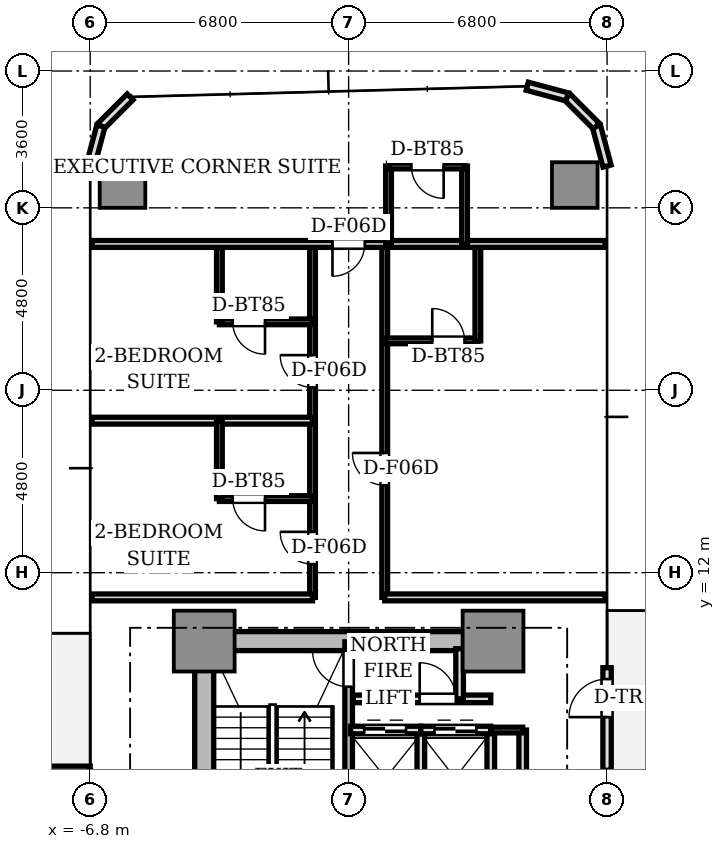
"""IFC4 building model, lengths in metres.
Left out: names, types, materials, properties, quantities, classifications, styles, units other than length and angle.
Written with IfcOpenShell. Run it as: python <this file> out.ifc"""

import sys

from ifc_helpers import new_model, si_unit, direction, frame, frame_2d, origin, origin_2d, place, context, subcontext, project, spatial, rectangle, extrude, source, transform, mapped, element, fill, save


model = new_model("IFC4")
c1 = context("Model", 3, precision=1e-05, world=origin(), true_north=direction((0.0, 1.0)))
c2 = subcontext(c1, "Body", "Model", "MODEL_VIEW")
j1 = project(units=[si_unit("LENGTHUNIT", "METRE"), si_unit("PLANEANGLEUNIT", "RADIAN")], contexts=[c1])
p1 = place(None, origin())
s1 = spatial("IfcSite", under=j1, at=p1, CompositionType="ELEMENT")
p2 = place(p1, origin())
s2 = spatial("IfcBuilding", under=s1, at=p2, CompositionType="ELEMENT")
p3 = place(p2, frame((0.0, 0.0, 54.4)))
s3 = spatial("IfcBuildingStorey", under=s2, at=p3, CompositionType="ELEMENT", Elevation=54.4)
p4 = place(p3, frame((-3.55, 10.2, 0.0), z_axis=(0.0, 0.0, 1.0), x_axis=(1.0, 0.0, 0.0)))
e1 = element("IfcWall", 1, at=p4, inside=s3, PredefinedType="SHEAR", context=c2, shape_type="SweptSolid", body=[
    extrude(rectangle(XDim=7.1, YDim=0.5, at=frame_2d((3.55, 0.0))), origin(), (0.0, 0.0, 1.0), 3.11),
])
p5 = place(p3, frame((-3.8, 2.85, 0.0), z_axis=(0.0, 0.0, 1.0), x_axis=(0.0, 1.0, 0.0)))
e2 = element("IfcWall", 2, at=p5, inside=s3, PredefinedType="SHEAR", context=c2, shape_type="SweptSolid", body=[
    extrude(rectangle(XDim=6.9, YDim=0.5, at=frame_2d((3.45, 0.0))), origin(), (0.0, 0.0, 1.0), 3.11),
])
m1 = source(origin(), c2, "Body", "SweptSolid", [
    extrude(rectangle(XDim=1.6, YDim=1.6, at=origin_2d()), origin(), (0.0, 0.0, 1.0), 3.11),
])
for number, where, z_axis, x_axis in (
    (3, (-3.8, 10.2, 0.0), (0.0, 0.0, 1.0), (1.0, 0.0, 0.0)),
    (4, (3.8, 10.2, 0.0), (0.0, 0.0, 1.0), (1.0, 0.0, 0.0)),
):
    element("IfcColumn", number, at=place(p3, frame(where, z_axis=z_axis, x_axis=x_axis)), inside=s3, PredefinedType="COLUMN", context=c2, shape_type="MappedRepresentation", body=[
        mapped(m1, transform((0.0, 0.0, 0.0), scale=1.0)),
    ])
m2 = source(origin(), c2, "Body", "SweptSolid", [
    extrude(rectangle(XDim=1.2, YDim=1.2, at=origin_2d()), origin(), (0.0, 0.0, 1.0), 3.11),
])
for number, where, z_axis, x_axis in (
    (5, (5.95, 22.2, 0.0), (0.0, 0.0, 1.0), (1.0, 0.0, 0.0)),
    (6, (-5.95, 22.2, 0.0), (0.0, 0.0, 1.0), (1.0, 0.0, 0.0)),
):
    element("IfcColumn", number, at=place(p3, frame(where, z_axis=z_axis, x_axis=x_axis)), inside=s3, PredefinedType="COLUMN", context=c2, shape_type="MappedRepresentation", body=[
        mapped(m2, transform((0.0, 0.0, 0.0), scale=1.0)),
    ])
p6 = place(p3, frame((6.8, 6.8, 0.0), z_axis=(0.0, 0.0, 1.0), x_axis=(0.0, 1.0, 0.0)))
e7 = element("IfcWall", 7, at=p6, inside=s3, PredefinedType="STANDARD", context=c2, shape_type="SweptSolid", body=[
    extrude(rectangle(XDim=2.7, YDim=0.22, at=frame_2d((1.35, 0.0))), origin(), (0.0, 0.0, 1.0), 3.11),
])
p7 = place(p6, frame((1.4, 0.0, 0.0)))
e8 = element("IfcOpeningElement", 8, at=p7, cuts=e7, PredefinedType="OPENING", context=c2, shape_type="SweptSolid", body=[
    extrude(rectangle(XDim=1.0, YDim=2.2, at=frame_2d((0.5, 1.1))), frame((0.0, 0.12, 0.0), z_axis=(0.0, -1.0, 0.0), x_axis=(1.0, 0.0, 0.0)), (0.0, 0.0, 1.0), 0.24),
])
for number, where, z_axis, x_axis in (
    (9, (6.8, 22.7, 0.0), (0.0, 0.0, 1.0), (-0.259, 0.966, 0.0)),
    (10, (6.519, 23.75, 0.0), (0.0, 0.0, 1.0), (-0.707, 0.707, 0.0)),
    (11, (5.75, 24.519, 0.0), (0.0, 0.0, 1.0), (-0.966, 0.259, 0.0)),
    (12, (-5.75, 24.519, 0.0), (0.0, 0.0, 1.0), (-0.707, -0.707, 0.0)),
    (13, (-6.519, 23.75, 0.0), (0.0, 0.0, 1.0), (-0.259, -0.966, 0.0)),
):
    element("IfcWall", number, at=place(p3, frame(where, z_axis=z_axis, x_axis=x_axis)), inside=s3, PredefinedType="STANDARD", context=c2, shape_type="SweptSolid", body=[
        extrude(rectangle(XDim=1.087, YDim=0.22, at=frame_2d((0.543, 0.0))), origin(), (0.0, 0.0, 1.0), 3.11),
    ])
p8 = place(p3, frame((-6.8, 6.8, 0.0), z_axis=(0.0, 0.0, 1.0), x_axis=(-1.0, 0.0, 0.0)))
e14 = element("IfcWall", 14, at=p8, inside=s3, PredefinedType="STANDARD", context=c2, shape_type="SweptSolid", body=[
    extrude(rectangle(XDim=2.7, YDim=0.22, at=frame_2d((1.35, 0.0))), origin(), (0.0, 0.0, 1.0), 3.11),
])
p9 = place(p8, frame((1.4, 0.0, 0.0)))
e15 = element("IfcOpeningElement", 15, at=p9, cuts=e14, PredefinedType="OPENING", context=c2, shape_type="SweptSolid", body=[
    extrude(rectangle(XDim=1.0, YDim=2.2, at=frame_2d((0.5, 1.1))), frame((0.0, 0.12, 0.0), z_axis=(0.0, -1.0, 0.0), x_axis=(1.0, 0.0, 0.0)), (0.0, 0.0, 1.0), 0.24),
])
p10 = place(p3, frame((0.0, 2.5, 0.0), z_axis=(0.0, 0.0, 1.0), x_axis=(0.0, 1.0, 0.0)))
e16 = element("IfcWall", 16, at=p10, inside=s3, PredefinedType="SOLIDWALL", context=c2, shape_type="SweptSolid", body=[
    extrude(rectangle(XDim=7.68, YDim=0.2, at=frame_2d((3.84, 0.0))), origin(), (0.0, 0.0, 1.0), 3.11),
])
p11 = place(p10, frame((6.5, 0.0, 0.0)))
e17 = element("IfcOpeningElement", 17, at=p11, cuts=e16, PredefinedType="OPENING", context=c2, shape_type="SweptSolid", body=[
    extrude(rectangle(XDim=0.95, YDim=2.15, at=frame_2d((0.475, 1.075))), frame((0.0, 0.11, 0.0), z_axis=(0.0, -1.0, 0.0), x_axis=(1.0, 0.0, 0.0)), (0.0, 0.0, 1.0), 0.22),
])
p12 = place(p3, frame((1.9, 5.38, 0.0), z_axis=(0.0, 0.0, 1.0), x_axis=(0.0, 1.0, 0.0)))
e18 = element("IfcWall", 18, at=p12, inside=s3, PredefinedType="SOLIDWALL", context=c2, shape_type="SweptSolid", body=[
    extrude(rectangle(XDim=2.48, YDim=0.2, at=frame_2d((1.24, 0.0))), origin(), (0.0, 0.0, 1.0), 2.66),
])
p13 = place(p3, frame((0.05, 7.86, 0.0), z_axis=(0.0, 0.0, 1.0), x_axis=(1.0, 0.0, 0.0)))
e19 = element("IfcWall", 19, at=p13, inside=s3, PredefinedType="SOLIDWALL", context=c2, shape_type="SweptSolid", body=[
    extrude(rectangle(XDim=1.85, YDim=0.2, at=frame_2d((0.925, 0.0))), origin(), (0.0, 0.0, 1.0), 2.66),
])
p14 = place(p13, frame((0.36, 0.0, 0.0)))
e20 = element("IfcOpeningElement", 20, at=p14, cuts=e19, PredefinedType="OPENING", context=c2, shape_type="SweptSolid", body=[
    extrude(rectangle(XDim=1.1, YDim=2.2, at=frame_2d((0.55, 1.1))), frame((0.0, 0.11, 0.0), z_axis=(0.0, -1.0, 0.0), x_axis=(1.0, 0.0, 0.0)), (0.0, 0.0, 1.0), 0.22),
])
p15 = place(p3, frame((3.74, 5.38, 0.0), z_axis=(0.0, 0.0, 1.0), x_axis=(0.0, 1.0, 0.0)))
e21 = element("IfcWall", 21, at=p15, inside=s3, PredefinedType="SOLIDWALL", context=c2, shape_type="SweptSolid", body=[
    extrude(rectangle(XDim=2.48, YDim=0.2, at=frame_2d((1.24, 0.0))), origin(), (0.0, 0.0, 1.0), 2.66),
])
p16 = place(p3, frame((1.9, 7.86, 0.0), z_axis=(0.0, 0.0, 1.0), x_axis=(1.0, 0.0, 0.0)))
e22 = element("IfcWall", 22, at=p16, inside=s3, PredefinedType="SOLIDWALL", context=c2, shape_type="SweptSolid", body=[
    extrude(rectangle(XDim=1.84, YDim=0.2, at=frame_2d((0.92, 0.0))), origin(), (0.0, 0.0, 1.0), 2.66),
])
p17 = place(p16, frame((0.36, 0.0, 0.0)))
e23 = element("IfcOpeningElement", 23, at=p17, cuts=e22, PredefinedType="OPENING", context=c2, shape_type="SweptSolid", body=[
    extrude(rectangle(XDim=1.1, YDim=2.2, at=frame_2d((0.55, 1.1))), frame((0.0, 0.11, 0.0), z_axis=(0.0, -1.0, 0.0), x_axis=(1.0, 0.0, 0.0)), (0.0, 0.0, 1.0), 0.22),
])
p18 = place(p3, frame((0.12, 8.68, 0.0), z_axis=(0.0, 0.0, 1.0), x_axis=(1.0, 0.0, 0.0)))
e24 = element("IfcWall", 24, at=p18, inside=s3, PredefinedType="SOLIDWALL", context=c2, shape_type="SweptSolid", body=[
    extrude(rectangle(XDim=3.62, YDim=0.2, at=frame_2d((1.81, 0.0))), origin(), (0.0, 0.0, 1.0), 2.66),
])
p19 = place(p18, frame((1.75, 0.0, 0.0)))
e25 = element("IfcOpeningElement", 25, at=p19, cuts=e24, PredefinedType="OPENING", context=c2, shape_type="SweptSolid", body=[
    extrude(rectangle(XDim=0.95, YDim=2.15, at=frame_2d((0.475, 1.075))), frame((0.0, 0.11, 0.0), z_axis=(0.0, -1.0, 0.0), x_axis=(1.0, 0.0, 0.0)), (0.0, 0.0, 1.0), 0.22),
])
p20 = place(p3, frame((2.92, 8.68, 0.0), z_axis=(0.0, 0.0, 1.0), x_axis=(0.0, 1.0, 0.0)))
e26 = element("IfcWall", 26, at=p20, inside=s3, PredefinedType="SOLIDWALL", context=c2, shape_type="SweptSolid", body=[
    extrude(rectangle(XDim=1.32, YDim=0.2, at=frame_2d((0.66, 0.0))), origin(), (0.0, 0.0, 1.0), 2.66),
])
p21 = place(p3, frame((4.58, 5.4, 0.0), z_axis=(0.0, 0.0, 1.0), x_axis=(0.0, 1.0, 0.0)))
e27 = element("IfcWall", 27, at=p21, inside=s3, PredefinedType="SOLIDWALL", context=c2, shape_type="SweptSolid", body=[
    extrude(rectangle(XDim=2.46, YDim=0.2, at=frame_2d((1.23, 0.0))), origin(), (0.0, 0.0, 1.0), 2.66),
])
p22 = place(p21, frame((0.55, 0.0, 0.0)))
e28 = element("IfcOpeningElement", 28, at=p22, cuts=e27, PredefinedType="OPENING", context=c2, shape_type="SweptSolid", body=[
    extrude(rectangle(XDim=0.85, YDim=2.1, at=frame_2d((0.425, 1.05))), frame((0.0, 0.11, 0.0), z_axis=(0.0, -1.0, 0.0), x_axis=(1.0, 0.0, 0.0)), (0.0, 0.0, 1.0), 0.22),
])
p23 = place(p3, frame((3.74, 7.86, 0.0), z_axis=(0.0, 0.0, 1.0), x_axis=(1.0, 0.0, 0.0)))
e29 = element("IfcWall", 29, at=p23, inside=s3, PredefinedType="PARTITIONING", context=c2, shape_type="SweptSolid", body=[
    extrude(rectangle(XDim=0.84, YDim=0.15, at=frame_2d((0.42, 0.0))), origin(), (0.0, 0.0, 1.0), 2.66),
])
p24 = place(p3, frame((-0.95, 11.35, 0.0), z_axis=(0.0, 0.0, 1.0), x_axis=(0.0, 1.0, 0.0)))
e30 = element("IfcWall", 30, at=p24, inside=s3, PredefinedType="PARTITIONING", context=c2, shape_type="SweptSolid", body=[
    extrude(rectangle(XDim=9.3, YDim=0.15, at=frame_2d((4.65, 0.0))), origin(), (0.0, 0.0, 1.0), 2.66),
])
p25 = place(p24, frame((0.875, 0.0, 0.0)))
e31 = element("IfcOpeningElement", 31, at=p25, cuts=e30, PredefinedType="OPENING", context=c2, shape_type="SweptSolid", body=[
    extrude(rectangle(XDim=0.85, YDim=2.1, at=frame_2d((0.425, 1.05))), frame((0.0, 0.085, 0.0), z_axis=(0.0, -1.0, 0.0), x_axis=(1.0, 0.0, 0.0)), (0.0, 0.0, 1.0), 0.17),
])
p26 = place(p24, frame((5.525, 0.0, 0.0)))
e32 = element("IfcOpeningElement", 32, at=p26, cuts=e30, PredefinedType="OPENING", context=c2, shape_type="SweptSolid", body=[
    extrude(rectangle(XDim=0.85, YDim=2.1, at=frame_2d((0.425, 1.05))), frame((0.0, 0.085, 0.0), z_axis=(0.0, -1.0, 0.0), x_axis=(1.0, 0.0, 0.0)), (0.0, 0.0, 1.0), 0.17),
])
p27 = place(p3, frame((0.95, 11.35, 0.0), z_axis=(0.0, 0.0, 1.0), x_axis=(0.0, 1.0, 0.0)))
e33 = element("IfcWall", 33, at=p27, inside=s3, PredefinedType="PARTITIONING", context=c2, shape_type="SweptSolid", body=[
    extrude(rectangle(XDim=9.3, YDim=0.15, at=frame_2d((4.65, 0.0))), origin(), (0.0, 0.0, 1.0), 2.66),
])
p28 = place(p27, frame((2.95, 0.0, 0.0)))
e34 = element("IfcOpeningElement", 34, at=p28, cuts=e33, PredefinedType="OPENING", context=c2, shape_type="SweptSolid", body=[
    extrude(rectangle(XDim=0.85, YDim=2.1, at=frame_2d((0.425, 1.05))), frame((0.0, 0.085, 0.0), z_axis=(0.0, -1.0, 0.0), x_axis=(1.0, 0.0, 0.0)), (0.0, 0.0, 1.0), 0.17),
])
for number, where, z_axis, x_axis in (
    (35, (-0.95, 11.35, 0.0), (0.0, 0.0, 1.0), (-1.0, 0.0, 0.0)),
    (36, (6.75, 11.35, 0.0), (0.0, 0.0, 1.0), (-1.0, 0.0, 0.0)),
    (37, (-0.95, 16.0, 0.0), (0.0, 0.0, 1.0), (-1.0, 0.0, 0.0)),
):
    element("IfcWall", number, at=place(p3, frame(where, z_axis=z_axis, x_axis=x_axis)), inside=s3, PredefinedType="PARTITIONING", context=c2, shape_type="SweptSolid", body=[
        extrude(rectangle(XDim=5.8, YDim=0.18, at=frame_2d((2.9, 0.0))), origin(), (0.0, 0.0, 1.0), 2.66),
    ])
p29 = place(p3, frame((-0.95, 13.95, 0.0), z_axis=(0.0, 0.0, 1.0), x_axis=(-1.0, 0.0, 0.0)))
e38 = element("IfcWall", 38, at=p29, inside=s3, PredefinedType="PARTITIONING", context=c2, shape_type="SweptSolid", body=[
    extrude(rectangle(XDim=2.45, YDim=0.15, at=frame_2d((1.225, 0.0))), origin(), (0.0, 0.0, 1.0), 2.66),
])
p30 = place(p29, frame((1.25, 0.0, 0.0)))
e39 = element("IfcOpeningElement", 39, at=p30, cuts=e38, PredefinedType="OPENING", context=c2, shape_type="SweptSolid", body=[
    extrude(rectangle(XDim=0.85, YDim=2.1, at=frame_2d((0.425, 1.05))), frame((0.0, 0.085, 0.0), z_axis=(0.0, -1.0, 0.0), x_axis=(1.0, 0.0, 0.0)), (0.0, 0.0, 1.0), 0.17),
])
p31 = place(p3, frame((-3.4, 13.95, 0.0), z_axis=(0.0, 0.0, 1.0), x_axis=(0.0, 1.0, 0.0)))
e40 = element("IfcWall", 40, at=p31, inside=s3, PredefinedType="PARTITIONING", context=c2, shape_type="SweptSolid", body=[
    extrude(rectangle(XDim=2.05, YDim=0.15, at=frame_2d((1.025, 0.0))), origin(), (0.0, 0.0, 1.0), 2.66),
])
p32 = place(p3, frame((-0.95, 18.6, 0.0), z_axis=(0.0, 0.0, 1.0), x_axis=(-1.0, 0.0, 0.0)))
e41 = element("IfcWall", 41, at=p32, inside=s3, PredefinedType="PARTITIONING", context=c2, shape_type="SweptSolid", body=[
    extrude(rectangle(XDim=2.45, YDim=0.15, at=frame_2d((1.225, 0.0))), origin(), (0.0, 0.0, 1.0), 2.66),
])
p33 = place(p32, frame((1.25, 0.0, 0.0)))
e42 = element("IfcOpeningElement", 42, at=p33, cuts=e41, PredefinedType="OPENING", context=c2, shape_type="SweptSolid", body=[
    extrude(rectangle(XDim=0.85, YDim=2.1, at=frame_2d((0.425, 1.05))), frame((0.0, 0.085, 0.0), z_axis=(0.0, -1.0, 0.0), x_axis=(1.0, 0.0, 0.0)), (0.0, 0.0, 1.0), 0.17),
])
p34 = place(p3, frame((-3.4, 18.6, 0.0), z_axis=(0.0, 0.0, 1.0), x_axis=(0.0, 1.0, 0.0)))
e43 = element("IfcWall", 43, at=p34, inside=s3, PredefinedType="PARTITIONING", context=c2, shape_type="SweptSolid", body=[
    extrude(rectangle(XDim=2.05, YDim=0.15, at=frame_2d((1.025, 0.0))), origin(), (0.0, 0.0, 1.0), 2.66),
])
p35 = place(p3, frame((0.95, 18.1, 0.0), z_axis=(0.0, 0.0, 1.0), x_axis=(1.0, 0.0, 0.0)))
e44 = element("IfcWall", 44, at=p35, inside=s3, PredefinedType="PARTITIONING", context=c2, shape_type="SweptSolid", body=[
    extrude(rectangle(XDim=2.45, YDim=0.15, at=frame_2d((1.225, 0.0))), origin(), (0.0, 0.0, 1.0), 2.66),
])
p36 = place(p35, frame((1.25, 0.0, 0.0)))
e45 = element("IfcOpeningElement", 45, at=p36, cuts=e44, PredefinedType="OPENING", context=c2, shape_type="SweptSolid", body=[
    extrude(rectangle(XDim=0.85, YDim=2.1, at=frame_2d((0.425, 1.05))), frame((0.0, 0.085, 0.0), z_axis=(0.0, -1.0, 0.0), x_axis=(1.0, 0.0, 0.0)), (0.0, 0.0, 1.0), 0.17),
])
p37 = place(p3, frame((3.4, 18.1, 0.0), z_axis=(0.0, 0.0, 1.0), x_axis=(0.0, 1.0, 0.0)))
e46 = element("IfcWall", 46, at=p37, inside=s3, PredefinedType="PARTITIONING", context=c2, shape_type="SweptSolid", body=[
    extrude(rectangle(XDim=2.55, YDim=0.15, at=frame_2d((1.275, 0.0))), origin(), (0.0, 0.0, 1.0), 2.66),
])
p38 = place(p3, frame((6.75, 20.65, 0.0), z_axis=(0.0, 0.0, 1.0), x_axis=(-1.0, 0.0, 0.0)))
e47 = element("IfcWall", 47, at=p38, inside=s3, PredefinedType="PARTITIONING", context=c2, shape_type="SweptSolid", body=[
    extrude(rectangle(XDim=13.5, YDim=0.18, at=frame_2d((6.75, 0.0))), origin(), (0.0, 0.0, 1.0), 2.66),
])
p39 = place(p38, frame((6.325, 0.0, 0.0)))
e48 = element("IfcOpeningElement", 48, at=p39, cuts=e47, PredefinedType="OPENING", context=c2, shape_type="SweptSolid", body=[
    extrude(rectangle(XDim=0.85, YDim=2.1, at=frame_2d((0.425, 1.05))), frame((0.0, 0.1, 0.0), z_axis=(0.0, -1.0, 0.0), x_axis=(1.0, 0.0, 0.0)), (0.0, 0.0, 1.0), 0.2),
])
for number, where, z_axis, x_axis in (
    (49, (1.05, 20.65, 0.0), (0.0, 0.0, 1.0), (0.0, 1.0, 0.0)),
    (50, (3.05, 20.65, 0.0), (0.0, 0.0, 1.0), (0.0, 1.0, 0.0)),
):
    element("IfcWall", number, at=place(p3, frame(where, z_axis=z_axis, x_axis=x_axis)), inside=s3, PredefinedType="PARTITIONING", context=c2, shape_type="SweptSolid", body=[
        extrude(rectangle(XDim=2.05, YDim=0.15, at=frame_2d((1.025, 0.0))), origin(), (0.0, 0.0, 1.0), 2.66),
    ])
p40 = place(p3, frame((3.05, 22.7, 0.0), z_axis=(0.0, 0.0, 1.0), x_axis=(-1.0, 0.0, 0.0)))
e51 = element("IfcWall", 51, at=p40, inside=s3, PredefinedType="PARTITIONING", context=c2, shape_type="SweptSolid", body=[
    extrude(rectangle(XDim=2.0, YDim=0.15, at=frame_2d((1.0, 0.0))), origin(), (0.0, 0.0, 1.0), 2.66),
])
p41 = place(p40, frame((0.55, 0.0, 0.0)))
e52 = element("IfcOpeningElement", 52, at=p41, cuts=e51, PredefinedType="OPENING", context=c2, shape_type="SweptSolid", body=[
    extrude(rectangle(XDim=0.85, YDim=2.1, at=frame_2d((0.425, 1.05))), frame((0.0, 0.085, 0.0), z_axis=(0.0, -1.0, 0.0), x_axis=(1.0, 0.0, 0.0)), (0.0, 0.0, 1.0), 0.17),
])
m3 = source(origin(), c2, "Body", "SweptSolid", [
    extrude(rectangle(XDim=1.0, YDim=0.05, at=origin_2d()), origin(), (0.0, 0.0, 1.0), 2.2),
])
p42 = place(p7, frame((0.5, 0.0, 0.0)))
e53 = element("IfcDoor", 53, at=p42, inside=s3, OperationType="SINGLE_SWING_LEFT", PredefinedType="DOOR", context=c2, shape_type="MappedRepresentation", body=[
    mapped(m3, transform((0.0, 0.0, 0.0), scale=1.0)),
])
fill(e8, e53)
m4 = source(origin(), c2, "Body", "SweptSolid", [
    extrude(rectangle(XDim=1.1, YDim=0.05, at=origin_2d()), origin(), (0.0, 0.0, 1.0), 2.2),
])
p43 = place(p14, frame((0.55, 0.0, 0.0)))
e54 = element("IfcDoor", 54, at=p43, inside=s3, OperationType="DOUBLE_DOOR_SLIDING", PredefinedType="DOOR", context=c2, shape_type="MappedRepresentation", body=[
    mapped(m4, transform((0.0, 0.0, 0.0), scale=1.0)),
])
fill(e20, e54)
p44 = place(p17, frame((0.55, 0.0, 0.0)))
e55 = element("IfcDoor", 55, at=p44, inside=s3, OperationType="DOUBLE_DOOR_SLIDING", PredefinedType="DOOR", context=c2, shape_type="MappedRepresentation", body=[
    mapped(m4, transform((0.0, 0.0, 0.0), scale=1.0)),
])
fill(e23, e55)
m5 = source(origin(), c2, "Body", "SweptSolid", [
    extrude(rectangle(XDim=0.95, YDim=0.05, at=origin_2d()), origin(), (0.0, 0.0, 1.0), 2.15),
])
p45 = place(p11, frame((0.475, 0.0, 0.0)))
e56 = element("IfcDoor", 56, at=p45, inside=s3, OperationType="SINGLE_SWING_RIGHT", PredefinedType="DOOR", context=c2, shape_type="MappedRepresentation", body=[
    mapped(m5, transform((0.0, 0.0, 0.0), scale=1.0)),
])
fill(e17, e56)
p46 = place(p19, frame((0.475, 0.0, 0.0)))
e57 = element("IfcDoor", 57, at=p46, inside=s3, OperationType="SINGLE_SWING_LEFT", PredefinedType="DOOR", context=c2, shape_type="MappedRepresentation", body=[
    mapped(m5, transform((0.0, 0.0, 0.0), scale=1.0)),
])
fill(e25, e57)
m6 = source(origin(), c2, "Body", "SweptSolid", [
    extrude(rectangle(XDim=0.85, YDim=0.05, at=origin_2d()), origin(), (0.0, 0.0, 1.0), 2.1),
])
p47 = place(p30, frame((0.425, 0.0, 0.0)))
e58 = element("IfcDoor", 58, at=p47, inside=s3, OperationType="SINGLE_SWING_LEFT", PredefinedType="DOOR", context=c2, shape_type="MappedRepresentation", body=[
    mapped(m6, transform((0.0, 0.0, 0.0), scale=1.0)),
])
fill(e39, e58)
p48 = place(p25, frame((0.425, 0.0, 0.0)))
e59 = element("IfcDoor", 59, at=p48, inside=s3, OperationType="SINGLE_SWING_RIGHT", PredefinedType="DOOR", context=c2, shape_type="MappedRepresentation", body=[
    mapped(m6, transform((0.0, 0.0, 0.0), scale=1.0)),
])
fill(e31, e59)
p49 = place(p33, frame((0.425, 0.0, 0.0)))
e60 = element("IfcDoor", 60, at=p49, inside=s3, OperationType="SINGLE_SWING_LEFT", PredefinedType="DOOR", context=c2, shape_type="MappedRepresentation", body=[
    mapped(m6, transform((0.0, 0.0, 0.0), scale=1.0)),
])
fill(e42, e60)
p50 = place(p26, frame((0.425, 0.0, 0.0)))
e61 = element("IfcDoor", 61, at=p50, inside=s3, OperationType="SINGLE_SWING_RIGHT", PredefinedType="DOOR", context=c2, shape_type="MappedRepresentation", body=[
    mapped(m6, transform((0.0, 0.0, 0.0), scale=1.0)),
])
fill(e32, e61)
p51 = place(p36, frame((0.425, 0.0, 0.0)))
e62 = element("IfcDoor", 62, at=p51, inside=s3, OperationType="SINGLE_SWING_LEFT", PredefinedType="DOOR", context=c2, shape_type="MappedRepresentation", body=[
    mapped(m6, transform((0.0, 0.0, 0.0), scale=1.0)),
])
fill(e45, e62)
p52 = place(p28, frame((0.425, 0.0, 0.0)))
e63 = element("IfcDoor", 63, at=p52, inside=s3, OperationType="SINGLE_SWING_RIGHT", PredefinedType="DOOR", context=c2, shape_type="MappedRepresentation", body=[
    mapped(m6, transform((0.0, 0.0, 0.0), scale=1.0)),
])
fill(e34, e63)
p53 = place(p41, frame((0.425, 0.0, 0.0)))
e64 = element("IfcDoor", 64, at=p53, inside=s3, OperationType="SINGLE_SWING_LEFT", PredefinedType="DOOR", context=c2, shape_type="MappedRepresentation", body=[
    mapped(m6, transform((0.0, 0.0, 0.0), scale=1.0)),
])
fill(e52, e64)
p54 = place(p39, frame((0.425, 0.0, 0.0)))
e65 = element("IfcDoor", 65, at=p54, inside=s3, OperationType="SINGLE_SWING_RIGHT", PredefinedType="DOOR", context=c2, shape_type="MappedRepresentation", body=[
    mapped(m6, transform((0.0, 0.0, 0.0), scale=1.0)),
])
fill(e48, e65)
save(model, sys.argv[1])
